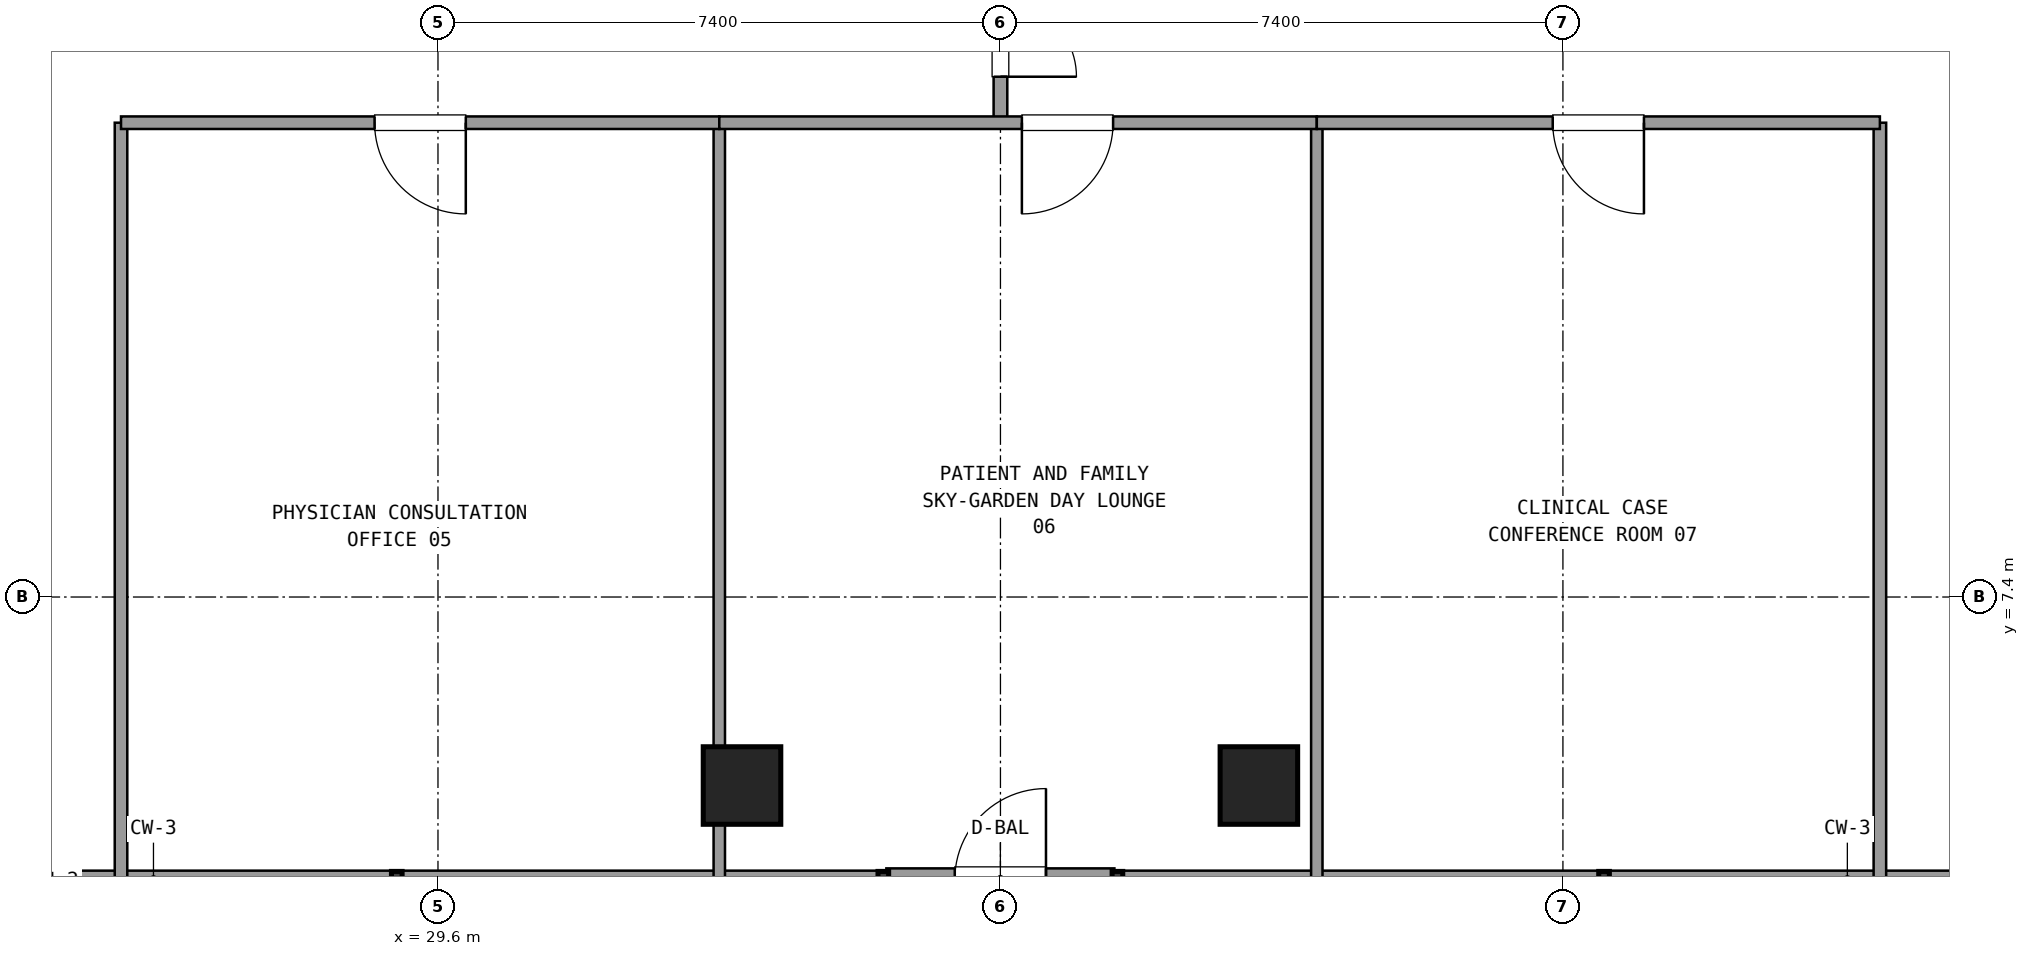
"""IFC4 building model, lengths in metres.
Left out: names, types, materials, properties, quantities, classifications, styles, units other than length and angle.
Written with IfcOpenShell. Run it as: python <this file> out.ifc"""

import sys

from ifc_helpers import new_model, si_unit, direction, frame, frame_2d, origin, origin_2d, place, context, subcontext, project, spatial, rectangle, extrude, element, fill, save


model = new_model("IFC4")
c1 = context("Model", 3, precision=1e-05, world=origin(), true_north=direction((0.0, 1.0)))
c2 = subcontext(c1, "Body", "Model", "MODEL_VIEW")
j1 = project(units=[si_unit("LENGTHUNIT", "METRE"), si_unit("PLANEANGLEUNIT", "RADIAN")], contexts=[c1])
p1 = place(None, origin())
s1 = spatial("IfcSite", under=j1, at=p1, CompositionType="ELEMENT")
p2 = place(p1, origin())
s2 = spatial("IfcBuilding", under=s1, at=p2, CompositionType="ELEMENT")
p3 = place(p2, frame((0.0, 0.0, 84.78)))
s3 = spatial("IfcBuildingStorey", under=s2, at=p3, CompositionType="ELEMENT", Elevation=84.78)
for number, where, z_axis, x_axis in (
    (1, (33.6, 4.92, 0.0), (0.0, 0.0, 1.0), (1.0, 0.0, 0.0)),
    (2, (40.4, 4.92, 0.0), (0.0, 0.0, 1.0), (1.0, 0.0, 0.0)),
):
    element("IfcColumn", number, at=place(p3, frame(where, z_axis=z_axis, x_axis=x_axis)), inside=s3, PredefinedType="COLUMN", context=c2, shape_type="SweptSolid", body=[
        extrude(rectangle(XDim=1.02, YDim=1.02, at=origin_2d()), origin(), (0.0, 0.0, 1.0), 3.579),
    ])
p4 = place(p3, frame((35.499, 3.68, 0.0), z_axis=(0.0, 0.0, 1.0), x_axis=(1.0, 0.0, 0.0)))
e3 = element("IfcWall", 3, at=p4, inside=s3, PredefinedType="SOLIDWALL", context=c2, shape_type="SweptSolid", body=[
    extrude(rectangle(XDim=3.0, YDim=0.3, at=frame_2d((1.5, 0.0))), origin(), (0.0, 0.0, 1.0), 2.67),
])
p5 = place(p4, frame((0.9, 0.0, 0.0)))
e4 = element("IfcOpeningElement", 4, at=p5, cuts=e3, PredefinedType="OPENING", context=c2, shape_type="SweptSolid", body=[
    extrude(rectangle(XDim=1.2, YDim=2.2, at=frame_2d((0.6, 1.1))), frame((0.0, 0.16, 0.0), z_axis=(0.0, -1.0, 0.0), x_axis=(1.0, 0.0, 0.0)), (0.0, 0.0, 1.0), 0.32),
])
p6 = place(p3, frame((16.255, 3.68, 0.0), z_axis=(0.0, 0.0, 1.0), x_axis=(1.0, 0.0, 0.0)))
e5 = element("IfcWall", 5, at=p6, inside=s3, PredefinedType="SOLIDWALL", context=c2, shape_type="SweptSolid", body=[
    extrude(rectangle(XDim=19.204, YDim=0.24, at=frame_2d((9.602, 0.0))), origin(), (0.0, 0.0, 1.0), 0.85),
])
p7 = place(p3, frame((38.539, 3.68, 0.0), z_axis=(0.0, 0.0, 1.0), x_axis=(1.0, 0.0, 0.0)))
e6 = element("IfcWall", 6, at=p7, inside=s3, PredefinedType="SOLIDWALL", context=c2, shape_type="SweptSolid", body=[
    extrude(rectangle(XDim=19.206, YDim=0.24, at=frame_2d((9.603, 0.0))), origin(), (0.0, 0.0, 1.0), 0.85),
])
p8 = place(p3, frame((37.0, 13.64, 0.0), z_axis=(0.0, 0.0, 1.0), x_axis=(0.0, 1.0, 0.0)))
e7 = element("IfcWall", 7, at=p8, inside=s3, PredefinedType="PARTITIONING", context=c2, shape_type="SweptSolid", body=[
    extrude(rectangle(XDim=3.21, YDim=0.18, at=frame_2d((1.605, 0.0))), origin(), (0.0, 0.0, 1.0), 2.61),
])
p9 = place(p8, frame((0.605, 0.0, 0.0)))
e8 = element("IfcOpeningElement", 8, at=p9, cuts=e7, PredefinedType="OPENING", context=c2, shape_type="SweptSolid", body=[
    extrude(rectangle(XDim=2.0, YDim=2.2, at=frame_2d((1.0, 1.1))), frame((0.0, 0.1, 0.0), z_axis=(0.0, -1.0, 0.0), x_axis=(1.0, 0.0, 0.0)), (0.0, 0.0, 1.0), 0.2),
])
for number, where, z_axis, x_axis in (
    (9, (25.43, 3.7, 0.0), (0.0, 0.0, 1.0), (0.0, 1.0, 0.0)),
    (10, (48.57, 3.7, 0.0), (0.0, 0.0, 1.0), (0.0, 1.0, 0.0)),
):
    element("IfcWall", number, at=place(p3, frame(where, z_axis=z_axis, x_axis=x_axis)), inside=s3, PredefinedType="PARTITIONING", context=c2, shape_type="SweptSolid", body=[
        extrude(rectangle(XDim=9.94, YDim=0.165, at=frame_2d((4.97, 0.0))), origin(), (0.0, 0.0, 1.0), 2.61),
    ])
p10 = place(p3, frame((33.301, 13.64, 0.0), z_axis=(0.0, 0.0, 1.0), x_axis=(0.0, -1.0, 0.0)))
e11 = element("IfcWall", 11, at=p10, inside=s3, PredefinedType="PARTITIONING", context=c2, shape_type="SweptSolid", body=[
    extrude(rectangle(XDim=9.94, YDim=0.15, at=frame_2d((4.97, 0.0))), origin(), (0.0, 0.0, 1.0), 2.61),
])
p11 = place(p3, frame((25.43, 13.64, 0.0), z_axis=(0.0, 0.0, 1.0), x_axis=(1.0, 0.0, 0.0)))
e12 = element("IfcWall", 12, at=p11, inside=s3, PredefinedType="PARTITIONING", context=c2, shape_type="SweptSolid", body=[
    extrude(rectangle(XDim=7.871, YDim=0.165, at=frame_2d((3.936, 0.0))), origin(), (0.0, 0.0, 1.0), 2.61),
])
p12 = place(p11, frame((3.336, 0.0, 0.0)))
e13 = element("IfcOpeningElement", 13, at=p12, cuts=e12, PredefinedType="OPENING", context=c2, shape_type="SweptSolid", body=[
    extrude(rectangle(XDim=1.2, YDim=2.15, at=frame_2d((0.6, 1.075))), frame((0.0, 0.093, 0.0), z_axis=(0.0, -1.0, 0.0), x_axis=(1.0, 0.0, 0.0)), (0.0, 0.0, 1.0), 0.185),
])
p13 = place(p3, frame((41.162, 13.64, 0.0), z_axis=(0.0, 0.0, 1.0), x_axis=(0.0, -1.0, 0.0)))
e14 = element("IfcWall", 14, at=p13, inside=s3, PredefinedType="PARTITIONING", context=c2, shape_type="SweptSolid", body=[
    extrude(rectangle(XDim=9.94, YDim=0.15, at=frame_2d((4.97, 0.0))), origin(), (0.0, 0.0, 1.0), 2.61),
])
p14 = place(p3, frame((33.301, 13.64, 0.0), z_axis=(0.0, 0.0, 1.0), x_axis=(1.0, 0.0, 0.0)))
e15 = element("IfcWall", 15, at=p14, inside=s3, PredefinedType="PARTITIONING", context=c2, shape_type="SweptSolid", body=[
    extrude(rectangle(XDim=7.861, YDim=0.165, at=frame_2d((3.931, 0.0))), origin(), (0.0, 0.0, 1.0), 2.61),
])
p15 = place(p14, frame((3.981, 0.0, 0.0)))
e16 = element("IfcOpeningElement", 16, at=p15, cuts=e15, PredefinedType="OPENING", context=c2, shape_type="SweptSolid", body=[
    extrude(rectangle(XDim=1.2, YDim=2.15, at=frame_2d((0.6, 1.075))), frame((0.0, 0.093, 0.0), z_axis=(0.0, -1.0, 0.0), x_axis=(1.0, 0.0, 0.0)), (0.0, 0.0, 1.0), 0.185),
])
p16 = place(p3, frame((41.162, 13.64, 0.0), z_axis=(0.0, 0.0, 1.0), x_axis=(1.0, 0.0, 0.0)))
e17 = element("IfcWall", 17, at=p16, inside=s3, PredefinedType="PARTITIONING", context=c2, shape_type="SweptSolid", body=[
    extrude(rectangle(XDim=7.408, YDim=0.165, at=frame_2d((3.704, 0.0))), origin(), (0.0, 0.0, 1.0), 2.61),
])
p17 = place(p16, frame((3.104, 0.0, 0.0)))
e18 = element("IfcOpeningElement", 18, at=p17, cuts=e17, PredefinedType="OPENING", context=c2, shape_type="SweptSolid", body=[
    extrude(rectangle(XDim=1.2, YDim=2.15, at=frame_2d((0.6, 1.075))), frame((0.0, 0.093, 0.0), z_axis=(0.0, -1.0, 0.0), x_axis=(1.0, 0.0, 0.0)), (0.0, 0.0, 1.0), 0.185),
])
p18 = place(p9, frame((2.0, 0.0, 0.0), z_axis=(0.0, 0.0, 1.0), x_axis=(-1.0, 0.0, 0.0)))
e19 = element("IfcDoor", 19, at=p18, inside=s3, OperationType="DOUBLE_DOOR_SINGLE_SWING", PredefinedType="DOOR", context=c2, shape_type="SweptSolid", body=[
    extrude(rectangle(XDim=2.0, YDim=2.2, at=frame_2d((1.0, 1.1))), frame((0.0, 0.025, 0.0), z_axis=(0.0, -1.0, 0.0), x_axis=(1.0, 0.0, 0.0)), (0.0, 0.0, 1.0), 0.05),
])
fill(e8, e19)
p19 = place(p12, frame((1.2, 0.0, 0.0), z_axis=(0.0, 0.0, 1.0), x_axis=(-1.0, 0.0, 0.0)))
e20 = element("IfcDoor", 20, at=p19, inside=s3, OperationType="SINGLE_SWING_RIGHT", PredefinedType="DOOR", context=c2, shape_type="SweptSolid", body=[
    extrude(rectangle(XDim=1.2, YDim=2.15, at=frame_2d((0.6, 1.075))), frame((0.0, 0.025, 0.0), z_axis=(0.0, -1.0, 0.0), x_axis=(1.0, 0.0, 0.0)), (0.0, 0.0, 1.0), 0.05),
])
fill(e13, e20)
p20 = place(p15, frame((1.2, 0.0, 0.0), z_axis=(0.0, 0.0, 1.0), x_axis=(-1.0, 0.0, 0.0)))
e21 = element("IfcDoor", 21, at=p20, inside=s3, OperationType="SINGLE_SWING_LEFT", PredefinedType="DOOR", context=c2, shape_type="SweptSolid", body=[
    extrude(rectangle(XDim=1.2, YDim=2.15, at=frame_2d((0.6, 1.075))), frame((0.0, 0.025, 0.0), z_axis=(0.0, -1.0, 0.0), x_axis=(1.0, 0.0, 0.0)), (0.0, 0.0, 1.0), 0.05),
])
fill(e16, e21)
p21 = place(p17, frame((1.2, 0.0, 0.0), z_axis=(0.0, 0.0, 1.0), x_axis=(-1.0, 0.0, 0.0)))
e22 = element("IfcDoor", 22, at=p21, inside=s3, OperationType="SINGLE_SWING_RIGHT", PredefinedType="DOOR", context=c2, shape_type="SweptSolid", body=[
    extrude(rectangle(XDim=1.2, YDim=2.15, at=frame_2d((0.6, 1.075))), frame((0.0, 0.025, 0.0), z_axis=(0.0, -1.0, 0.0), x_axis=(1.0, 0.0, 0.0)), (0.0, 0.0, 1.0), 0.05),
])
fill(e18, e22)
save(model, sys.argv[1])
